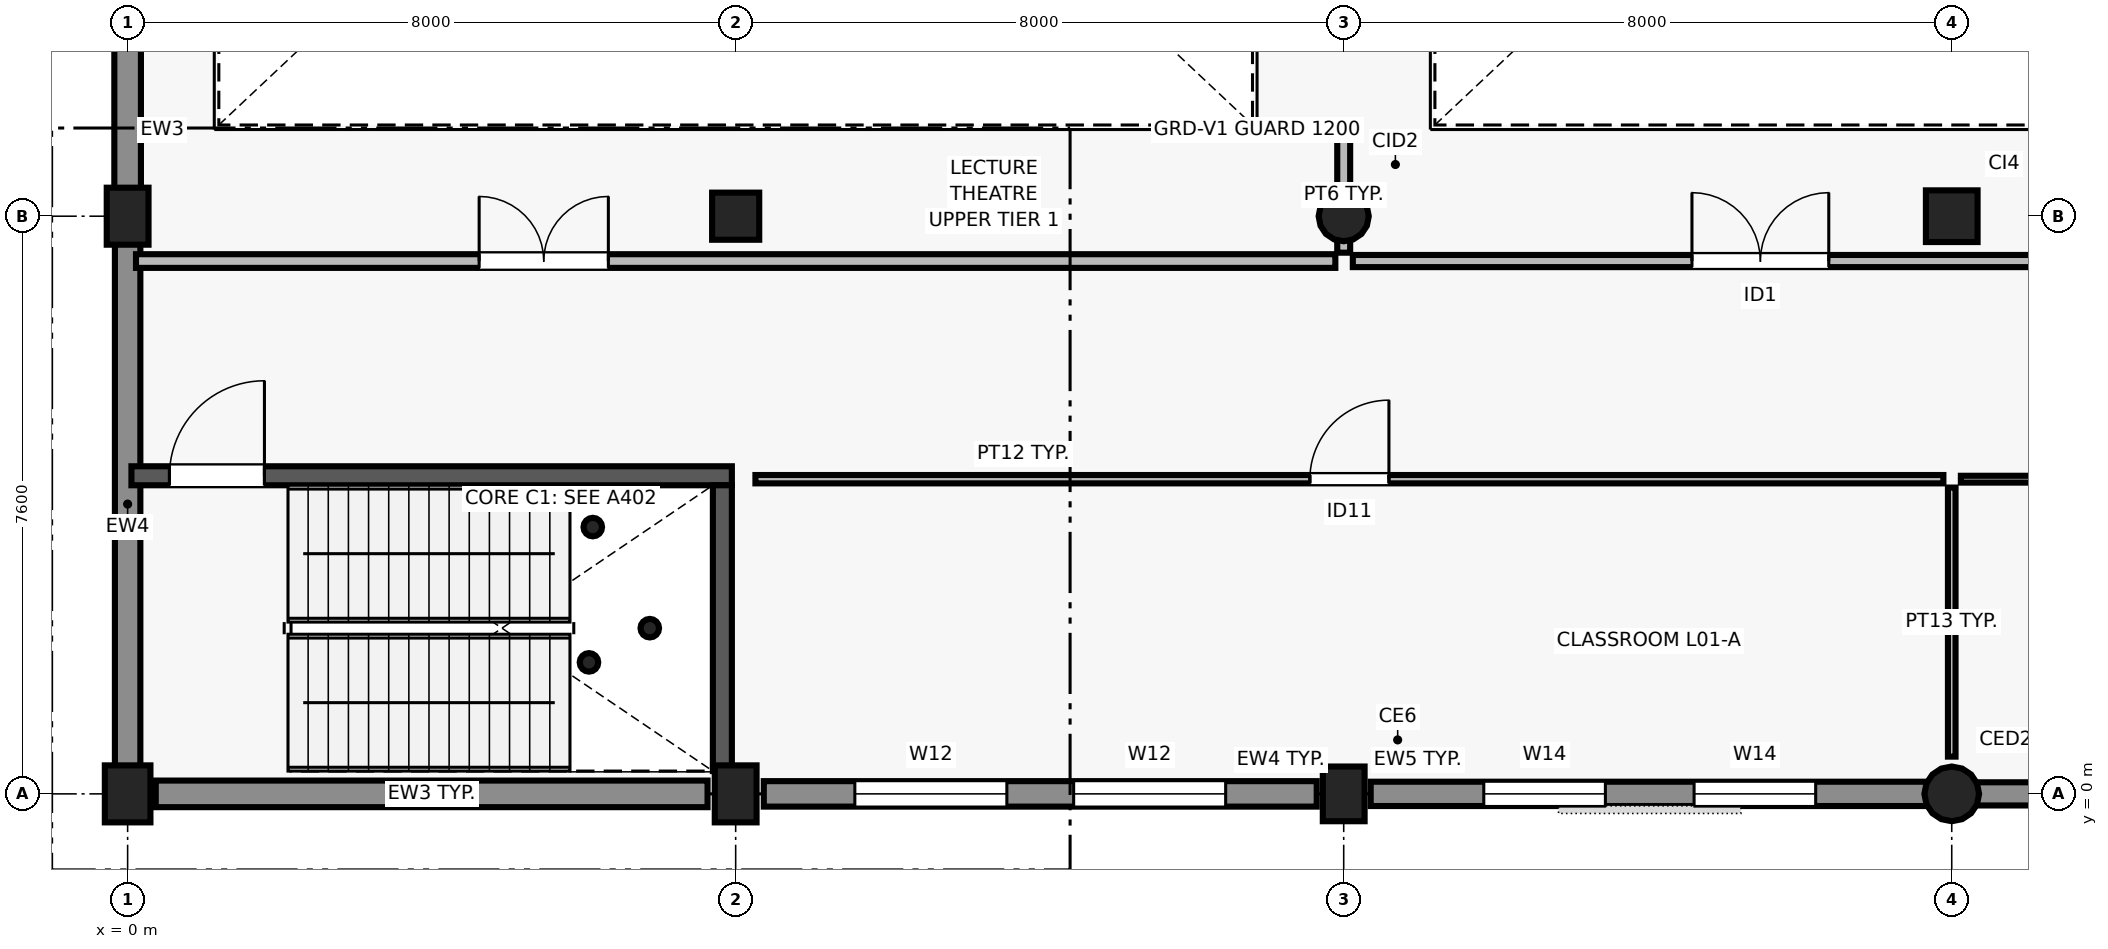
"""IFC4 building model, lengths in metres.
Left out: names, types, materials, properties, quantities, classifications, styles, units other than length and angle.
Written with IfcOpenShell. Run it as: python <this file> out.ifc"""

import sys

from ifc_helpers import new_model, si_unit, direction, frame, frame_2d, origin, origin_with_axes, origin_2d, place, context, subcontext, project, spatial, rectangle, circle, hollow_circle, extrude, element, fill, save


model = new_model("IFC4")
c1 = context("Model", 3, precision=1e-05, world=origin(), true_north=direction((0.0, 1.0)))
c2 = subcontext(c1, "Body", "Model", "MODEL_VIEW")
j1 = project(units=[si_unit("LENGTHUNIT", "METRE"), si_unit("PLANEANGLEUNIT", "RADIAN")], contexts=[c1])
p1 = place(None, origin())
s1 = spatial("IfcSite", under=j1, at=p1, CompositionType="ELEMENT")
p2 = place(p1, origin())
s2 = spatial("IfcBuilding", under=s1, at=p2, CompositionType="ELEMENT")
p3 = place(p2, frame((0.0, 0.0, 4.5)))
s3 = spatial("IfcBuildingStorey", under=s2, at=p3, CompositionType="ELEMENT", Elevation=4.5)
p4 = place(p3, origin_with_axes())
e1 = element("IfcColumn", 1, at=p4, inside=s3, PredefinedType="COLUMN", context=c2, shape_type="SweptSolid", body=[
    extrude(rectangle(XDim=0.75, YDim=0.6, at=origin_2d()), origin(), (0.0, 0.0, 1.0), 4.5),
])
for number, where, z_axis, x_axis in (
    (2, (0.0, 7.6, 0.0), (0.0, 0.0, 1.0), (1.0, 0.0, 0.0)),
    (3, (8.0, 0.0, 0.0), (0.0, 0.0, 1.0), (1.0, 0.0, 0.0)),
):
    element("IfcColumn", number, at=place(p3, frame(where, z_axis=z_axis, x_axis=x_axis)), inside=s3, PredefinedType="COLUMN", context=c2, shape_type="SweptSolid", body=[
        extrude(rectangle(XDim=0.75, YDim=0.55, at=origin_2d()), origin(), (0.0, 0.0, 1.0), 4.5),
    ])
p5 = place(p3, frame((8.0, 7.6, 0.0), z_axis=(0.0, 0.0, 1.0), x_axis=(1.0, 0.0, 0.0)))
e4 = element("IfcColumn", 4, at=p5, inside=s3, PredefinedType="COLUMN", context=c2, shape_type="SweptSolid", body=[
    extrude(rectangle(XDim=0.62, YDim=0.62, at=origin_2d()), origin(), (0.0, 0.0, 1.0), 4.5),
])
p6 = place(p3, frame((16.0, 0.0, 0.0), z_axis=(0.0, 0.0, 1.0), x_axis=(1.0, 0.0, 0.0)))
e5 = element("IfcColumn", 5, at=p6, inside=s3, PredefinedType="COLUMN", context=c2, shape_type="SweptSolid", body=[
    extrude(rectangle(XDim=0.72, YDim=0.55, at=origin_2d()), origin(), (0.0, 0.0, 1.0), 4.5),
])
p7 = place(p3, frame((16.0, 7.6, 0.0), z_axis=(0.0, 0.0, 1.0), x_axis=(1.0, 0.0, 0.0)))
e6 = element("IfcColumn", 6, at=p7, inside=s3, PredefinedType="COLUMN", context=c2, shape_type="SweptSolid", body=[
    extrude(circle(Radius=0.33, at=origin_2d()), origin(), (0.0, 0.0, 1.0), 4.5),
])
p8 = place(p3, frame((24.0, 0.0, 0.0), z_axis=(0.0, 0.0, 1.0), x_axis=(1.0, 0.0, 0.0)))
e7 = element("IfcColumn", 7, at=p8, inside=s3, PredefinedType="COLUMN", context=c2, shape_type="SweptSolid", body=[
    extrude(circle(Radius=0.36, at=origin_2d()), origin(), (0.0, 0.0, 1.0), 4.5),
])
p9 = place(p3, frame((24.0, 7.6, 0.0), z_axis=(0.0, 0.0, 1.0), x_axis=(1.0, 0.0, 0.0)))
e8 = element("IfcColumn", 8, at=p9, inside=s3, PredefinedType="COLUMN", context=c2, shape_type="SweptSolid", body=[
    extrude(rectangle(XDim=0.68, YDim=0.68, at=origin_2d()), origin(), (0.0, 0.0, 1.0), 4.5),
])
p10 = place(p3, frame((0.37, 0.0, 0.0), z_axis=(0.0, 0.0, 1.0), x_axis=(1.0, 0.0, 0.0)))
e9 = element("IfcWall", 9, at=p10, inside=s3, PredefinedType="SOLIDWALL", context=c2, shape_type="SweptSolid", body=[
    extrude(rectangle(XDim=7.26, YDim=0.35, at=frame_2d((3.63, 0.0))), origin(), (0.0, 0.0, 1.0), 4.22),
])
p11 = place(p3, frame((8.37, 0.0, 0.0), z_axis=(0.0, 0.0, 1.0), x_axis=(1.0, 0.0, 0.0)))
e10 = element("IfcWall", 10, at=p11, inside=s3, PredefinedType="SOLIDWALL", context=c2, shape_type="SweptSolid", body=[
    extrude(rectangle(XDim=7.275, YDim=0.335, at=frame_2d((3.637, 0.0))), origin(), (0.0, 0.0, 1.0), 4.22),
])
p12 = place(p11, frame((1.198, 0.0, 0.9)))
e11 = element("IfcOpeningElement", 11, at=p12, cuts=e10, PredefinedType="OPENING", context=c2, shape_type="SweptSolid", body=[
    extrude(rectangle(XDim=2.0, YDim=1.5, at=frame_2d((1.0, 0.75))), frame((0.0, 0.177, 0.0), z_axis=(0.0, -1.0, 0.0), x_axis=(1.0, 0.0, 0.0)), (0.0, 0.0, 1.0), 0.355),
])
p13 = place(p11, frame((4.077, 0.0, 0.9)))
e12 = element("IfcOpeningElement", 12, at=p13, cuts=e10, PredefinedType="OPENING", context=c2, shape_type="SweptSolid", body=[
    extrude(rectangle(XDim=2.0, YDim=1.5, at=frame_2d((1.0, 0.75))), frame((0.0, 0.177, 0.0), z_axis=(0.0, -1.0, 0.0), x_axis=(1.0, 0.0, 0.0)), (0.0, 0.0, 1.0), 0.355),
])
p14 = place(p3, frame((16.355, 0.0, 0.0), z_axis=(0.0, 0.0, 1.0), x_axis=(1.0, 0.0, 0.0)))
e13 = element("IfcWall", 13, at=p14, inside=s3, PredefinedType="SOLIDWALL", context=c2, shape_type="SweptSolid", body=[
    extrude(rectangle(XDim=7.343, YDim=0.32, at=frame_2d((3.671, 0.0))), origin(), (0.0, 0.0, 1.0), 3.57),
])
p15 = place(p14, frame((1.488, 0.0, 0.9)))
e14 = element("IfcOpeningElement", 14, at=p15, cuts=e13, PredefinedType="OPENING", context=c2, shape_type="SweptSolid", body=[
    extrude(rectangle(XDim=1.6, YDim=1.5, at=frame_2d((0.8, 0.75))), frame((0.0, 0.17, 0.0), z_axis=(0.0, -1.0, 0.0), x_axis=(1.0, 0.0, 0.0)), (0.0, 0.0, 1.0), 0.34),
])
p16 = place(p14, frame((4.255, 0.0, 0.9)))
e15 = element("IfcOpeningElement", 15, at=p16, cuts=e13, PredefinedType="OPENING", context=c2, shape_type="SweptSolid", body=[
    extrude(rectangle(XDim=1.6, YDim=1.5, at=frame_2d((0.8, 0.75))), frame((0.0, 0.17, 0.0), z_axis=(0.0, -1.0, 0.0), x_axis=(1.0, 0.0, 0.0)), (0.0, 0.0, 1.0), 0.34),
])
p17 = place(p3, frame((24.302, 0.0, 0.0), z_axis=(0.0, 0.0, 1.0), x_axis=(1.0, 0.0, 0.0)))
e16 = element("IfcWall", 16, at=p17, inside=s3, PredefinedType="SOLIDWALL", context=c2, shape_type="SweptSolid", body=[
    extrude(rectangle(XDim=7.327, YDim=0.305, at=frame_2d((3.664, 0.0))), origin(), (0.0, 0.0, 1.0), 3.57),
])
p18 = place(p17, frame((1.749, 0.0, 0.9)))
e17 = element("IfcOpeningElement", 17, at=p18, cuts=e16, PredefinedType="OPENING", context=c2, shape_type="SweptSolid", body=[
    extrude(rectangle(XDim=1.2, YDim=1.5, at=frame_2d((0.6, 0.75))), frame((0.0, 0.162, 0.0), z_axis=(0.0, -1.0, 0.0), x_axis=(1.0, 0.0, 0.0)), (0.0, 0.0, 1.0), 0.325),
])
p19 = place(p17, frame((4.378, 0.0, 0.9)))
e18 = element("IfcOpeningElement", 18, at=p19, cuts=e16, PredefinedType="OPENING", context=c2, shape_type="SweptSolid", body=[
    extrude(rectangle(XDim=1.2, YDim=1.5, at=frame_2d((0.6, 0.75))), frame((0.0, 0.162, 0.0), z_axis=(0.0, -1.0, 0.0), x_axis=(1.0, 0.0, 0.0)), (0.0, 0.0, 1.0), 0.325),
])
p20 = place(p3, frame((0.0, 14.93, 0.0), z_axis=(0.0, 0.0, 1.0), x_axis=(0.0, -1.0, 0.0)))
e19 = element("IfcWall", 19, at=p20, inside=s3, PredefinedType="SOLIDWALL", context=c2, shape_type="SweptSolid", body=[
    extrude(rectangle(XDim=7.06, YDim=0.35, at=frame_2d((3.53, 0.0))), origin(), (0.0, 0.0, 1.0), 3.78),
])
p21 = place(p20, frame((1.1, 0.0, 0.9)))
e20 = element("IfcOpeningElement", 20, at=p21, cuts=e19, PredefinedType="OPENING", context=c2, shape_type="SweptSolid", body=[
    extrude(rectangle(XDim=1.6, YDim=1.8, at=frame_2d((0.8, 0.9))), frame((0.0, 0.185, 0.0), z_axis=(0.0, -1.0, 0.0), x_axis=(1.0, 0.0, 0.0)), (0.0, 0.0, 1.0), 0.37),
])
p22 = place(p20, frame((3.48, 0.0, 0.9)))
e21 = element("IfcOpeningElement", 21, at=p22, cuts=e19, PredefinedType="OPENING", context=c2, shape_type="SweptSolid", body=[
    extrude(rectangle(XDim=1.6, YDim=1.8, at=frame_2d((0.8, 0.9))), frame((0.0, 0.185, 0.0), z_axis=(0.0, -1.0, 0.0), x_axis=(1.0, 0.0, 0.0)), (0.0, 0.0, 1.0), 0.37),
])
p23 = place(p3, frame((0.0, 7.33, 0.0), z_axis=(0.0, 0.0, 1.0), x_axis=(0.0, -1.0, 0.0)))
e22 = element("IfcWall", 22, at=p23, inside=s3, PredefinedType="SOLIDWALL", context=c2, shape_type="SweptSolid", body=[
    extrude(rectangle(XDim=7.035, YDim=0.335, at=frame_2d((3.518, 0.0))), origin(), (0.0, 0.0, 1.0), 3.76),
])
for number, where, z_axis, x_axis in (
    (23, (6.07, 1.73, 0.0), (0.0, 0.0, 1.0), (1.0, 0.0, 0.0)),
    (24, (6.12, 3.51, 0.0), (0.0, 0.0, 1.0), (1.0, 0.0, 0.0)),
    (25, (6.87, 2.18, 0.0), (0.0, 0.0, 1.0), (1.0, 0.0, 0.0)),
):
    element("IfcColumn", number, at=place(p3, frame(where, z_axis=z_axis, x_axis=x_axis)), inside=s3, PredefinedType="COLUMN", context=c2, shape_type="SweptSolid", body=[
        extrude(hollow_circle(Radius=0.122, WallThickness=0.01, at=origin_2d()), origin(), (0.0, 0.0, 1.0), 4.5),
    ])
p24 = place(p3, frame((0.05, 4.185, 0.0), z_axis=(0.0, 0.0, 1.0), x_axis=(1.0, 0.0, 0.0)))
e26 = element("IfcWall", 26, at=p24, inside=s3, PredefinedType="SHEAR", context=c2, shape_type="SweptSolid", body=[
    extrude(rectangle(XDim=7.9, YDim=0.25, at=frame_2d((3.95, 0.0))), origin(), (0.0, 0.0, 1.0), 4.22),
])
p25 = place(p24, frame((0.5, 0.0, 0.0)))
e27 = element("IfcOpeningElement", 27, at=p25, cuts=e26, PredefinedType="OPENING", context=c2, shape_type="SweptSolid", body=[
    extrude(rectangle(XDim=1.25, YDim=2.2, at=frame_2d((0.625, 1.1))), frame((0.0, 0.135, 0.0), z_axis=(0.0, -1.0, 0.0), x_axis=(1.0, 0.0, 0.0)), (0.0, 0.0, 1.0), 0.27),
])
p26 = place(p3, frame((7.825, 0.3, 0.0), z_axis=(0.0, 0.0, 1.0), x_axis=(0.0, 1.0, 0.0)))
e28 = element("IfcWall", 28, at=p26, inside=s3, PredefinedType="SHEAR", context=c2, shape_type="SweptSolid", body=[
    extrude(rectangle(XDim=3.76, YDim=0.25, at=frame_2d((1.88, 0.0))), origin(), (0.0, 0.0, 1.0), 4.22),
])
p27 = place(p3, frame((8.26, 4.14, 0.0), z_axis=(0.0, 0.0, 1.0), x_axis=(1.0, 0.0, 0.0)))
e29 = element("IfcWall", 29, at=p27, inside=s3, PredefinedType="PARTITIONING", context=c2, shape_type="SweptSolid", body=[
    extrude(rectangle(XDim=15.63, YDim=0.11, at=frame_2d((7.815, 0.0))), origin(), (0.0, 0.0, 1.0), 4.2),
])
p28 = place(p27, frame((7.295, 0.0, 0.0)))
e30 = element("IfcOpeningElement", 30, at=p28, cuts=e29, PredefinedType="OPENING", context=c2, shape_type="SweptSolid", body=[
    extrude(rectangle(XDim=1.04, YDim=2.15, at=frame_2d((0.52, 1.075))), frame((0.0, 0.065, 0.0), z_axis=(0.0, -1.0, 0.0), x_axis=(1.0, 0.0, 0.0)), (0.0, 0.0, 1.0), 0.13),
])
p29 = place(p3, frame((24.0, 0.49, 0.0), z_axis=(0.0, 0.0, 1.0), x_axis=(0.0, 1.0, 0.0)))
e31 = element("IfcWall", 31, at=p29, inside=s3, PredefinedType="PARTITIONING", context=c2, shape_type="SweptSolid", body=[
    extrude(rectangle(XDim=3.54, YDim=0.1, at=frame_2d((1.77, 0.0))), origin(), (0.0, 0.0, 1.0), 3.77),
])
p30 = place(p3, frame((24.12, 4.14, 0.0), z_axis=(0.0, 0.0, 1.0), x_axis=(1.0, 0.0, 0.0)))
e32 = element("IfcWall", 32, at=p30, inside=s3, PredefinedType="PARTITIONING", context=c2, shape_type="SweptSolid", body=[
    extrude(rectangle(XDim=16.57, YDim=0.09, at=frame_2d((8.285, 0.0))), origin(), (0.0, 0.0, 1.0), 4.2),
])
p31 = place(p30, frame((7.745, 0.0, 0.0)))
e33 = element("IfcOpeningElement", 33, at=p31, cuts=e32, PredefinedType="OPENING", context=c2, shape_type="SweptSolid", body=[
    extrude(rectangle(XDim=1.08, YDim=2.15, at=frame_2d((0.54, 1.075))), frame((0.0, 0.055, 0.0), z_axis=(0.0, -1.0, 0.0), x_axis=(1.0, 0.0, 0.0)), (0.0, 0.0, 1.0), 0.11),
])
p32 = place(p3, frame((0.11, 7.01, 0.0), z_axis=(0.0, 0.0, 1.0), x_axis=(1.0, 0.0, 0.0)))
e34 = element("IfcWall", 34, at=p32, inside=s3, PredefinedType="PARTITIONING", context=c2, shape_type="SweptSolid", body=[
    extrude(rectangle(XDim=15.78, YDim=0.18, at=frame_2d((7.89, 0.0))), origin(), (0.0, 0.0, 1.0), 4.2),
])
p33 = place(p32, frame((4.515, 0.0, 0.0)))
e35 = element("IfcOpeningElement", 35, at=p33, cuts=e34, PredefinedType="OPENING", context=c2, shape_type="SweptSolid", body=[
    extrude(rectangle(XDim=1.7, YDim=2.3, at=frame_2d((0.85, 1.15))), frame((0.0, 0.1, 0.0), z_axis=(0.0, -1.0, 0.0), x_axis=(1.0, 0.0, 0.0)), (0.0, 0.0, 1.0), 0.2),
])
p34 = place(p3, frame((16.0, 7.12, 0.0), z_axis=(0.0, 0.0, 1.0), x_axis=(0.0, 1.0, 0.0)))
e36 = element("IfcWall", 36, at=p34, inside=s3, PredefinedType="PARTITIONING", context=c2, shape_type="SweptSolid", body=[
    extrude(rectangle(XDim=1.52, YDim=0.17, at=frame_2d((0.76, 0.0))), origin(), (0.0, 0.0, 1.0), 3.64),
])
p35 = place(p3, frame((16.12, 7.01, 0.0), z_axis=(0.0, 0.0, 1.0), x_axis=(1.0, 0.0, 0.0)))
e37 = element("IfcWall", 37, at=p35, inside=s3, PredefinedType="PARTITIONING", context=c2, shape_type="SweptSolid", body=[
    extrude(rectangle(XDim=15.77, YDim=0.16, at=frame_2d((7.885, 0.0))), origin(), (0.0, 0.0, 1.0), 4.2),
])
p36 = place(p35, frame((4.462, 0.0, 0.0)))
e38 = element("IfcOpeningElement", 38, at=p36, cuts=e37, PredefinedType="OPENING", context=c2, shape_type="SweptSolid", body=[
    extrude(rectangle(XDim=1.8, YDim=2.3, at=frame_2d((0.9, 1.15))), frame((0.0, 0.09, 0.0), z_axis=(0.0, -1.0, 0.0), x_axis=(1.0, 0.0, 0.0)), (0.0, 0.0, 1.0), 0.18),
])
p37 = place(p12, origin())
e39 = element("IfcWindow", 39, at=p37, inside=s3, PartitioningType="SINGLE_PANEL", PredefinedType="WINDOW", context=c2, shape_type="SweptSolid", body=[
    extrude(rectangle(XDim=2.0, YDim=1.5, at=frame_2d((1.0, 0.75))), frame((0.0, 0.03, 0.0), z_axis=(0.0, -1.0, 0.0), x_axis=(1.0, 0.0, 0.0)), (0.0, 0.0, 1.0), 0.06),
])
fill(e11, e39)
p38 = place(p13, origin())
e40 = element("IfcWindow", 40, at=p38, inside=s3, PartitioningType="SINGLE_PANEL", PredefinedType="WINDOW", context=c2, shape_type="SweptSolid", body=[
    extrude(rectangle(XDim=2.0, YDim=1.5, at=frame_2d((1.0, 0.75))), frame((0.0, 0.03, 0.0), z_axis=(0.0, -1.0, 0.0), x_axis=(1.0, 0.0, 0.0)), (0.0, 0.0, 1.0), 0.06),
])
fill(e12, e40)
p39 = place(p15, origin())
e41 = element("IfcWindow", 41, at=p39, inside=s3, PartitioningType="SINGLE_PANEL", PredefinedType="WINDOW", context=c2, shape_type="SweptSolid", body=[
    extrude(rectangle(XDim=1.6, YDim=1.5, at=frame_2d((0.8, 0.75))), frame((0.0, 0.03, 0.0), z_axis=(0.0, -1.0, 0.0), x_axis=(1.0, 0.0, 0.0)), (0.0, 0.0, 1.0), 0.06),
])
fill(e14, e41)
p40 = place(p16, origin())
e42 = element("IfcWindow", 42, at=p40, inside=s3, PartitioningType="SINGLE_PANEL", PredefinedType="WINDOW", context=c2, shape_type="SweptSolid", body=[
    extrude(rectangle(XDim=1.6, YDim=1.5, at=frame_2d((0.8, 0.75))), frame((0.0, 0.03, 0.0), z_axis=(0.0, -1.0, 0.0), x_axis=(1.0, 0.0, 0.0)), (0.0, 0.0, 1.0), 0.06),
])
fill(e15, e42)
p41 = place(p25, origin())
e43 = element("IfcDoor", 43, at=p41, inside=s3, OperationType="SINGLE_SWING_RIGHT", PredefinedType="DOOR", context=c2, shape_type="SweptSolid", body=[
    extrude(rectangle(XDim=1.25, YDim=2.2, at=frame_2d((0.625, 1.1))), frame((0.0, 0.025, 0.0), z_axis=(0.0, -1.0, 0.0), x_axis=(1.0, 0.0, 0.0)), (0.0, 0.0, 1.0), 0.05),
])
fill(e27, e43)
p42 = place(p28, origin())
e44 = element("IfcDoor", 44, at=p42, inside=s3, OperationType="SINGLE_SWING_RIGHT", PredefinedType="DOOR", context=c2, shape_type="SweptSolid", body=[
    extrude(rectangle(XDim=1.04, YDim=2.15, at=frame_2d((0.52, 1.075))), frame((0.0, 0.025, 0.0), z_axis=(0.0, -1.0, 0.0), x_axis=(1.0, 0.0, 0.0)), (0.0, 0.0, 1.0), 0.05),
])
fill(e30, e44)
p43 = place(p33, origin())
e45 = element("IfcDoor", 45, at=p43, inside=s3, OperationType="DOUBLE_DOOR_SINGLE_SWING", PredefinedType="DOOR", context=c2, shape_type="SweptSolid", body=[
    extrude(rectangle(XDim=1.7, YDim=2.3, at=frame_2d((0.85, 1.15))), frame((0.0, 0.025, 0.0), z_axis=(0.0, -1.0, 0.0), x_axis=(1.0, 0.0, 0.0)), (0.0, 0.0, 1.0), 0.05),
])
fill(e35, e45)
p44 = place(p36, origin())
e46 = element("IfcDoor", 46, at=p44, inside=s3, OperationType="DOUBLE_DOOR_SINGLE_SWING", PredefinedType="DOOR", context=c2, shape_type="SweptSolid", body=[
    extrude(rectangle(XDim=1.8, YDim=2.3, at=frame_2d((0.9, 1.15))), frame((0.0, 0.025, 0.0), z_axis=(0.0, -1.0, 0.0), x_axis=(1.0, 0.0, 0.0)), (0.0, 0.0, 1.0), 0.05),
])
fill(e38, e46)
save(model, sys.argv[1])
